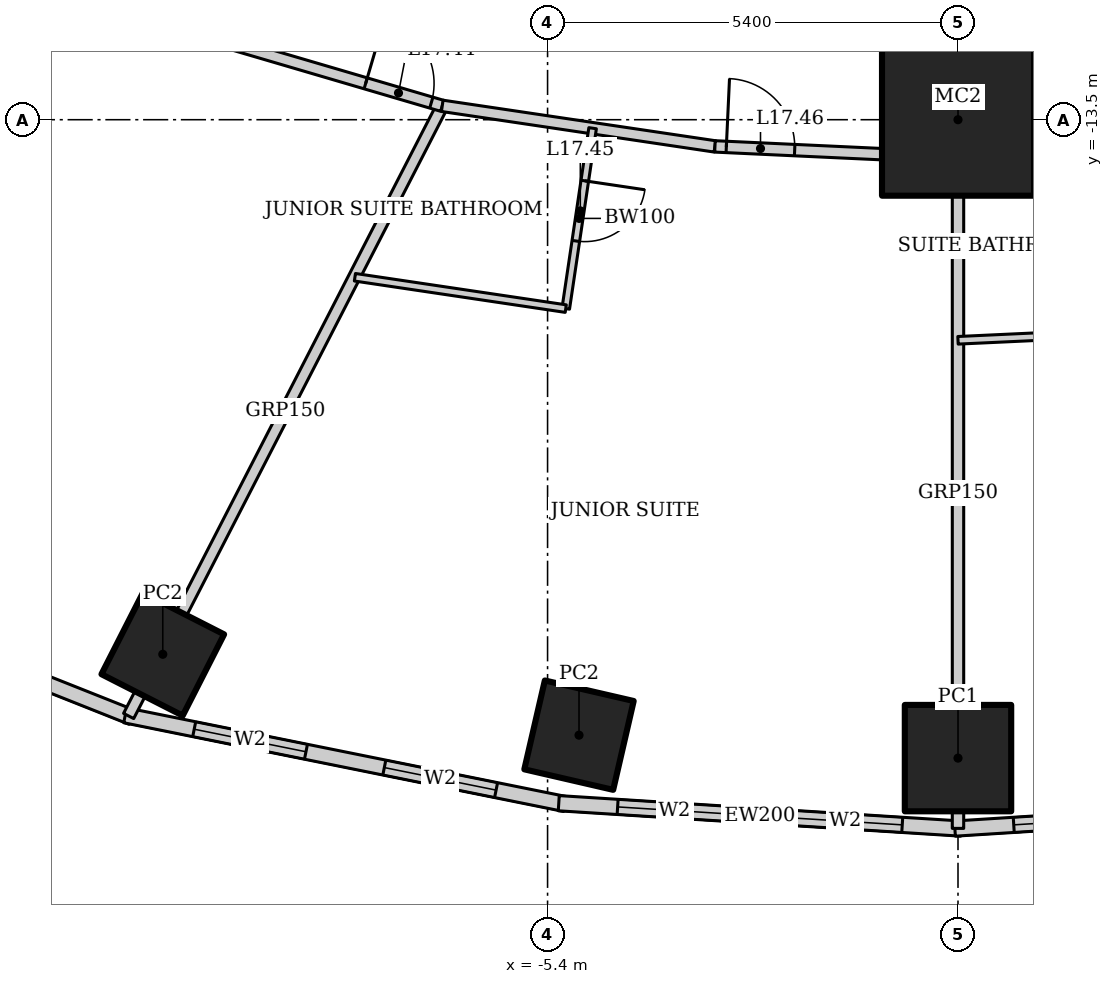
"""IFC4 building model, lengths in metres.
Left out: names, types, materials, properties, quantities, classifications, styles, units other than length and angle.
Written with IfcOpenShell. Run it as: python <this file> out.ifc"""

import sys

from ifc_helpers import new_model, si_unit, direction, frame, frame_2d, origin, origin_2d, place, context, subcontext, project, spatial, rectangle, hollow_rectangle, extrude, element, fill, save


model = new_model("IFC4")
c1 = context("Model", 3, precision=1e-05, world=origin(), true_north=direction((0.0, 1.0)))
c2 = subcontext(c1, "Body", "Model", "MODEL_VIEW")
j1 = project(units=[si_unit("LENGTHUNIT", "METRE"), si_unit("PLANEANGLEUNIT", "RADIAN")], contexts=[c1])
p1 = place(None, origin())
s1 = spatial("IfcSite", under=j1, at=p1, CompositionType="ELEMENT")
p2 = place(p1, origin())
s2 = spatial("IfcBuilding", under=s1, at=p2, CompositionType="ELEMENT")
p3 = place(p2, frame((0.0, 0.0, 76.6)))
s3 = spatial("IfcBuildingStorey", under=s2, at=p3, CompositionType="ELEMENT", Elevation=76.6)
p4 = place(p3, frame((0.0, -13.5, 0.0), z_axis=(0.0, 0.0, 1.0), x_axis=(1.0, 0.0, 0.0)))
e1 = element("IfcColumn", 1, at=p4, inside=s3, PredefinedType="COLUMN", context=c2, shape_type="SweptSolid", body=[
    extrude(hollow_rectangle(XDim=2.0, YDim=2.0, WallThickness=0.17, at=origin_2d()), origin(), (0.0, 0.0, 1.0), 3.6),
])
for number, where, z_axis, x_axis in (
    (2, (-10.463, -20.534, 0.0), (0.0, 0.0, 1.0), (0.454, 0.891, 0.0)),
    (3, (-4.986, -21.598, 0.0), (0.0, 0.0, 1.0), (0.225, 0.974, 0.0)),
):
    element("IfcColumn", number, at=place(p3, frame(where, z_axis=z_axis, x_axis=x_axis)), inside=s3, PredefinedType="COLUMN", context=c2, shape_type="SweptSolid", body=[
        extrude(hollow_rectangle(XDim=1.2, YDim=1.2, WallThickness=0.1, at=origin_2d()), origin(), (0.0, 0.0, 1.0), 3.6),
    ])
p5 = place(p3, frame((0.0, -21.9, 0.0), z_axis=(0.0, 0.0, 1.0), x_axis=(1.0, 0.0, 0.0)))
e4 = element("IfcColumn", 4, at=p5, inside=s3, PredefinedType="COLUMN", context=c2, shape_type="SweptSolid", body=[
    extrude(hollow_rectangle(XDim=1.4, YDim=1.4, WallThickness=0.1, at=origin_2d()), origin(), (0.0, 0.0, 1.0), 3.6),
])
p6 = place(p3, frame((-18.018, -18.523, 0.0), z_axis=(0.0, 0.0, 1.0), x_axis=(0.929358351251, -0.369178892895, 0.0)))
e5 = element("IfcWall", 5, at=p6, inside=s3, PredefinedType="SOLIDWALL", context=c2, shape_type="SweptSolid", body=[
    extrude(rectangle(XDim=7.692, YDim=0.2, at=frame_2d((3.846, 0.0))), origin(), (0.0, 0.0, 1.0), 3.45),
])
p7 = place(p6, frame((1.373, 0.0, 0.5)))
e6 = element("IfcOpeningElement", 6, at=p7, cuts=e5, PredefinedType="OPENING", context=c2, shape_type="SweptSolid", body=[
    extrude(rectangle(XDim=1.5, YDim=2.2, at=frame_2d((0.75, 1.1))), frame((0.0, 0.11, 0.0), z_axis=(0.0, -1.0, 0.0), x_axis=(1.0, 0.0, 0.0)), (0.0, 0.0, 1.0), 0.22),
])
p8 = place(p6, frame((4.819, 0.0, 0.5)))
e7 = element("IfcOpeningElement", 7, at=p8, cuts=e5, PredefinedType="OPENING", context=c2, shape_type="SweptSolid", body=[
    extrude(rectangle(XDim=1.5, YDim=2.2, at=frame_2d((0.75, 1.1))), frame((0.0, 0.11, 0.0), z_axis=(0.0, -1.0, 0.0), x_axis=(1.0, 0.0, 0.0)), (0.0, 0.0, 1.0), 0.22),
])
p9 = place(p3, frame((-10.957, -21.337, 0.0), z_axis=(0.0, 0.0, 1.0), x_axis=(0.980251657452, -0.197754110105, 0.0)))
e8 = element("IfcWall", 8, at=p9, inside=s3, PredefinedType="SOLIDWALL", context=c2, shape_type="SweptSolid", body=[
    extrude(rectangle(XDim=5.904, YDim=0.2, at=frame_2d((2.952, 0.0))), origin(), (0.0, 0.0, 1.0), 3.45),
])
p10 = place(p9, frame((0.926, 0.0, 0.5)))
e9 = element("IfcOpeningElement", 9, at=p10, cuts=e8, PredefinedType="OPENING", context=c2, shape_type="SweptSolid", body=[
    extrude(rectangle(XDim=1.5, YDim=2.2, at=frame_2d((0.75, 1.1))), frame((0.0, 0.11, 0.0), z_axis=(0.0, -1.0, 0.0), x_axis=(1.0, 0.0, 0.0)), (0.0, 0.0, 1.0), 0.22),
])
p11 = place(p9, frame((3.478, 0.0, 0.5)))
e10 = element("IfcOpeningElement", 10, at=p11, cuts=e8, PredefinedType="OPENING", context=c2, shape_type="SweptSolid", body=[
    extrude(rectangle(XDim=1.5, YDim=2.2, at=frame_2d((0.75, 1.1))), frame((0.0, 0.11, 0.0), z_axis=(0.0, -1.0, 0.0), x_axis=(1.0, 0.0, 0.0)), (0.0, 0.0, 1.0), 0.22),
])
p12 = place(p3, frame((-5.253, -22.493, 0.0), z_axis=(0.0, 0.0, 1.0), x_axis=(0.998018582375, -0.062919863585, 0.0)))
e11 = element("IfcWall", 11, at=p12, inside=s3, PredefinedType="SOLIDWALL", context=c2, shape_type="SweptSolid", body=[
    extrude(rectangle(XDim=5.304, YDim=0.2, at=frame_2d((2.652, 0.0))), origin(), (0.0, 0.0, 1.0), 3.45),
])
p13 = place(p12, frame((0.776, 0.0, 0.5)))
e12 = element("IfcOpeningElement", 12, at=p13, cuts=e11, PredefinedType="OPENING", context=c2, shape_type="SweptSolid", body=[
    extrude(rectangle(XDim=1.5, YDim=2.2, at=frame_2d((0.75, 1.1))), frame((0.0, 0.11, 0.0), z_axis=(0.0, -1.0, 0.0), x_axis=(1.0, 0.0, 0.0)), (0.0, 0.0, 1.0), 0.22),
])
p14 = place(p12, frame((3.028, 0.0, 0.5)))
e13 = element("IfcOpeningElement", 13, at=p14, cuts=e11, PredefinedType="OPENING", context=c2, shape_type="SweptSolid", body=[
    extrude(rectangle(XDim=1.5, YDim=2.2, at=frame_2d((0.75, 1.1))), frame((0.0, 0.11, 0.0), z_axis=(0.0, -1.0, 0.0), x_axis=(1.0, 0.0, 0.0)), (0.0, 0.0, 1.0), 0.22),
])
p15 = place(p3, frame((-0.041, -22.827, 0.0), z_axis=(0.0, 0.0, 1.0), x_axis=(0.998018582375, 0.062919863585, 0.0)))
e14 = element("IfcWall", 14, at=p15, inside=s3, PredefinedType="SOLIDWALL", context=c2, shape_type="SweptSolid", body=[
    extrude(rectangle(XDim=5.304, YDim=0.2, at=frame_2d((2.652, 0.0))), origin(), (0.0, 0.0, 1.0), 3.45),
])
p16 = place(p15, frame((0.776, 0.0, 0.5)))
e15 = element("IfcOpeningElement", 15, at=p16, cuts=e14, PredefinedType="OPENING", context=c2, shape_type="SweptSolid", body=[
    extrude(rectangle(XDim=1.5, YDim=2.2, at=frame_2d((0.75, 1.1))), frame((0.0, 0.11, 0.0), z_axis=(0.0, -1.0, 0.0), x_axis=(1.0, 0.0, 0.0)), (0.0, 0.0, 1.0), 0.22),
])
p17 = place(p15, frame((3.028, 0.0, 0.5)))
e16 = element("IfcOpeningElement", 16, at=p17, cuts=e14, PredefinedType="OPENING", context=c2, shape_type="SweptSolid", body=[
    extrude(rectangle(XDim=1.5, YDim=2.2, at=frame_2d((0.75, 1.1))), frame((0.0, 0.11, 0.0), z_axis=(0.0, -1.0, 0.0), x_axis=(1.0, 0.0, 0.0)), (0.0, 0.0, 1.0), 0.22),
])
p18 = place(p3, frame((-10.912, -21.346, 0.0), z_axis=(0.0, 0.0, 1.0), x_axis=(0.457117602022, 0.889406261458, 0.0)))
e17 = element("IfcWall", 17, at=p18, inside=s3, PredefinedType="PARTITIONING", context=c2, shape_type="SweptSolid", body=[
    extrude(rectangle(XDim=9.027, YDim=0.15, at=frame_2d((4.513, 0.0))), origin(), (0.0, 0.0, 1.0), 2.528),
])
p19 = place(p3, frame((0.0, -22.825, 0.0), z_axis=(0.0, 0.0, 1.0), x_axis=(0.0, 1.0, 0.0)))
e18 = element("IfcWall", 18, at=p19, inside=s3, PredefinedType="PARTITIONING", context=c2, shape_type="SweptSolid", body=[
    extrude(rectangle(XDim=8.825, YDim=0.15, at=frame_2d((4.412, 0.0))), origin(), (0.0, 0.0, 1.0), 2.924),
])
p20 = place(p3, frame((-11.519, -11.928, 0.0), z_axis=(0.0, 0.0, 1.0), x_axis=(0.959496227294, -0.281721475589, 0.0)))
e19 = element("IfcWall", 19, at=p20, inside=s3, PredefinedType="PARTITIONING", context=c2, shape_type="SweptSolid", body=[
    extrude(rectangle(XDim=4.933, YDim=0.15, at=frame_2d((2.466, 0.0))), origin(), (0.0, 0.0, 1.0), 3.45),
])
p21 = place(p20, frame((3.883, 0.0, 0.0)))
e20 = element("IfcOpeningElement", 20, at=p21, cuts=e19, PredefinedType="OPENING", context=c2, shape_type="SweptSolid", body=[
    extrude(rectangle(XDim=0.9, YDim=2.1, at=frame_2d((0.45, 1.05))), frame((0.0, 0.085, 0.0), z_axis=(0.0, -1.0, 0.0), x_axis=(1.0, 0.0, 0.0)), (0.0, 0.0, 1.0), 0.17),
])
p22 = place(p3, frame((-6.786, -13.317, 0.0), z_axis=(0.0, 0.0, 1.0), x_axis=(0.989107488999, -0.14719502439, 0.0)))
e21 = element("IfcWall", 21, at=p22, inside=s3, PredefinedType="PARTITIONING", context=c2, shape_type="SweptSolid", body=[
    extrude(rectangle(XDim=3.627, YDim=0.15, at=frame_2d((1.814, 0.0))), origin(), (0.0, 0.0, 1.0), 3.45),
])
p23 = place(p3, frame((-3.198, -13.851, 0.0), z_axis=(0.0, 0.0, 1.0), x_axis=(0.998920826789, -0.046445471333, 0.0)))
e22 = element("IfcWall", 22, at=p23, inside=s3, PredefinedType="PARTITIONING", context=c2, shape_type="SweptSolid", body=[
    extrude(rectangle(XDim=3.201, YDim=0.15, at=frame_2d((1.601, 0.0))), origin(), (0.0, 0.0, 1.0), 3.45),
])
p24 = place(p23, frame((0.15, 0.0, 0.0)))
e23 = element("IfcOpeningElement", 23, at=p24, cuts=e22, PredefinedType="OPENING", context=c2, shape_type="SweptSolid", body=[
    extrude(rectangle(XDim=0.9, YDim=2.1, at=frame_2d((0.45, 1.05))), frame((0.0, 0.085, 0.0), z_axis=(0.0, -1.0, 0.0), x_axis=(1.0, 0.0, 0.0)), (0.0, 0.0, 1.0), 0.17),
])
p25 = place(p3, frame((0.0, -14.0, 0.0), z_axis=(0.0, 0.0, 1.0), x_axis=(0.998920826789, 0.046445471333, 0.0)))
e24 = element("IfcWall", 24, at=p25, inside=s3, PredefinedType="PARTITIONING", context=c2, shape_type="SweptSolid", body=[
    extrude(rectangle(XDim=3.201, YDim=0.15, at=frame_2d((1.601, 0.0))), origin(), (0.0, 0.0, 1.0), 3.45),
])
p26 = place(p3, frame((-4.807, -13.612, 0.0), z_axis=(0.0, 0.0, 1.0), x_axis=(-0.147201193874, -0.989106570862, 0.0)))
e25 = element("IfcWall", 25, at=p26, inside=s3, PredefinedType="PARTITIONING", context=c2, shape_type="SweptSolid", body=[
    extrude(rectangle(XDim=2.4, YDim=0.1, at=frame_2d((1.2, 0.0))), origin(), (0.0, 0.0, 1.0), 3.45),
])
p27 = place(p26, frame((0.7, 0.0, 0.0)))
e26 = element("IfcOpeningElement", 26, at=p27, cuts=e25, PredefinedType="OPENING", context=c2, shape_type="SweptSolid", body=[
    extrude(rectangle(XDim=0.8, YDim=2.1, at=frame_2d((0.4, 1.05))), frame((0.0, 0.06, 0.0), z_axis=(0.0, -1.0, 0.0), x_axis=(1.0, 0.0, 0.0)), (0.0, 0.0, 1.0), 0.12),
])
p28 = place(p3, frame((-5.161, -15.986, 0.0), z_axis=(0.0, 0.0, 1.0), x_axis=(-0.98910744157, 0.147195343104, 0.0)))
e27 = element("IfcWall", 27, at=p28, inside=s3, PredefinedType="PARTITIONING", context=c2, shape_type="SweptSolid", body=[
    extrude(rectangle(XDim=2.805, YDim=0.1, at=frame_2d((1.402, 0.0))), origin(), (0.0, 0.0, 1.0), 3.45),
])
p29 = place(p3, frame((2.109, -16.304, 0.0), z_axis=(0.0, 0.0, 1.0), x_axis=(-0.998919337223, -0.04647749694, 0.0)))
e28 = element("IfcWall", 28, at=p29, inside=s3, PredefinedType="PARTITIONING", context=c2, shape_type="SweptSolid", body=[
    extrude(rectangle(XDim=2.112, YDim=0.1, at=frame_2d((1.056, 0.0))), origin(), (0.0, 0.0, 1.0), 3.45),
])
p30 = place(p10, origin())
e29 = element("IfcWindow", 29, at=p30, inside=s3, PartitioningType="SINGLE_PANEL", PredefinedType="WINDOW", context=c2, shape_type="SweptSolid", body=[
    extrude(rectangle(XDim=1.5, YDim=2.2, at=frame_2d((0.75, 1.1))), frame((0.0, 0.03, 0.0), z_axis=(0.0, -1.0, 0.0), x_axis=(1.0, 0.0, 0.0)), (0.0, 0.0, 1.0), 0.06),
])
fill(e9, e29)
p31 = place(p11, origin())
e30 = element("IfcWindow", 30, at=p31, inside=s3, PartitioningType="SINGLE_PANEL", PredefinedType="WINDOW", context=c2, shape_type="SweptSolid", body=[
    extrude(rectangle(XDim=1.5, YDim=2.2, at=frame_2d((0.75, 1.1))), frame((0.0, 0.03, 0.0), z_axis=(0.0, -1.0, 0.0), x_axis=(1.0, 0.0, 0.0)), (0.0, 0.0, 1.0), 0.06),
])
fill(e10, e30)
p32 = place(p13, origin())
e31 = element("IfcWindow", 31, at=p32, inside=s3, PartitioningType="SINGLE_PANEL", PredefinedType="WINDOW", context=c2, shape_type="SweptSolid", body=[
    extrude(rectangle(XDim=1.5, YDim=2.2, at=frame_2d((0.75, 1.1))), frame((0.0, 0.03, 0.0), z_axis=(0.0, -1.0, 0.0), x_axis=(1.0, 0.0, 0.0)), (0.0, 0.0, 1.0), 0.06),
])
fill(e12, e31)
p33 = place(p14, origin())
e32 = element("IfcWindow", 32, at=p33, inside=s3, PartitioningType="SINGLE_PANEL", PredefinedType="WINDOW", context=c2, shape_type="SweptSolid", body=[
    extrude(rectangle(XDim=1.5, YDim=2.2, at=frame_2d((0.75, 1.1))), frame((0.0, 0.03, 0.0), z_axis=(0.0, -1.0, 0.0), x_axis=(1.0, 0.0, 0.0)), (0.0, 0.0, 1.0), 0.06),
])
fill(e13, e32)
p34 = place(p16, origin())
e33 = element("IfcWindow", 33, at=p34, inside=s3, PartitioningType="SINGLE_PANEL", PredefinedType="WINDOW", context=c2, shape_type="SweptSolid", body=[
    extrude(rectangle(XDim=1.5, YDim=2.2, at=frame_2d((0.75, 1.1))), frame((0.0, 0.03, 0.0), z_axis=(0.0, -1.0, 0.0), x_axis=(1.0, 0.0, 0.0)), (0.0, 0.0, 1.0), 0.06),
])
fill(e15, e33)
p35 = place(p21, origin())
e34 = element("IfcDoor", 34, at=p35, inside=s3, OperationType="SINGLE_SWING_LEFT", PredefinedType="DOOR", context=c2, shape_type="SweptSolid", body=[
    extrude(rectangle(XDim=0.9, YDim=2.1, at=frame_2d((0.45, 1.05))), frame((0.0, 0.025, 0.0), z_axis=(0.0, -1.0, 0.0), x_axis=(1.0, 0.0, 0.0)), (0.0, 0.0, 1.0), 0.05),
])
fill(e20, e34)
p36 = place(p27, origin())
e35 = element("IfcDoor", 35, at=p36, inside=s3, OperationType="SINGLE_SWING_LEFT", PredefinedType="DOOR", context=c2, shape_type="SweptSolid", body=[
    extrude(rectangle(XDim=0.8, YDim=2.1, at=frame_2d((0.4, 1.05))), frame((0.0, 0.025, 0.0), z_axis=(0.0, -1.0, 0.0), x_axis=(1.0, 0.0, 0.0)), (0.0, 0.0, 1.0), 0.05),
])
fill(e26, e35)
p37 = place(p24, origin())
e36 = element("IfcDoor", 36, at=p37, inside=s3, OperationType="SINGLE_SWING_LEFT", PredefinedType="DOOR", context=c2, shape_type="SweptSolid", body=[
    extrude(rectangle(XDim=0.9, YDim=2.1, at=frame_2d((0.45, 1.05))), frame((0.0, 0.025, 0.0), z_axis=(0.0, -1.0, 0.0), x_axis=(1.0, 0.0, 0.0)), (0.0, 0.0, 1.0), 0.05),
])
fill(e23, e36)
save(model, sys.argv[1])
